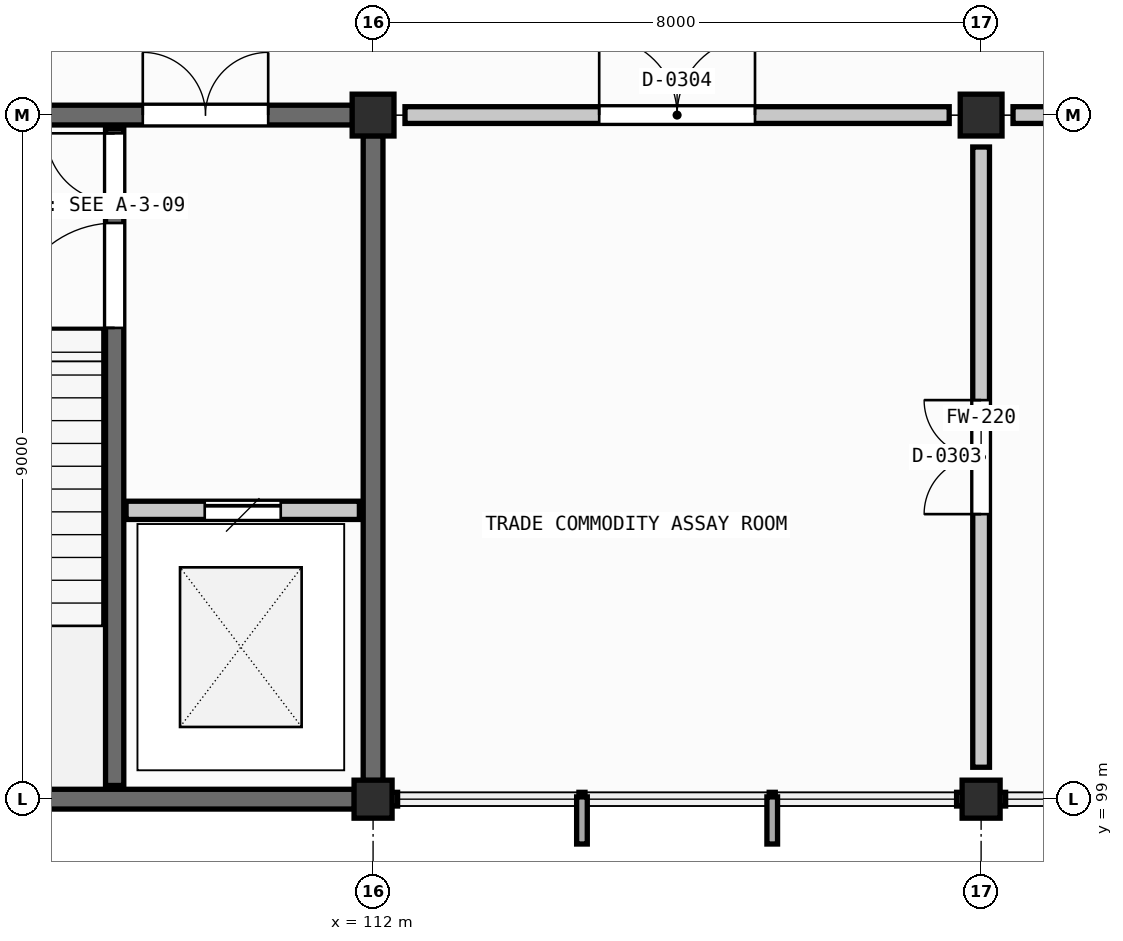
"""IFC4 building model, lengths in metres.
Left out: names, types, materials, properties, quantities, classifications, styles, units other than length and angle.
Written with IfcOpenShell. Run it as: python <this file> out.ifc"""

import sys

from ifc_helpers import new_model, si_unit, direction, frame, frame_2d, origin, origin_2d, place, context, subcontext, project, spatial, rectangle, extrude, element, fill, save


model = new_model("IFC4")
c1 = context("Model", 3, precision=1e-05, world=origin(), true_north=direction((0.0, 1.0)))
c2 = subcontext(c1, "Body", "Model", "MODEL_VIEW")
j1 = project(units=[si_unit("LENGTHUNIT", "METRE"), si_unit("PLANEANGLEUNIT", "RADIAN")], contexts=[c1])
p1 = place(None, origin())
s1 = spatial("IfcSite", under=j1, at=p1, CompositionType="ELEMENT")
p2 = place(p1, origin())
s2 = spatial("IfcBuilding", under=s1, at=p2, CompositionType="ELEMENT")
p3 = place(p2, frame((0.0, 0.0, 13.2)))
s3 = spatial("IfcBuildingStorey", under=s2, at=p3, CompositionType="ELEMENT", Elevation=13.2)
p4 = place(p3, frame((112.0, 99.0, 0.0), z_axis=(0.0, 0.0, 1.0), x_axis=(1.0, 0.0, 0.0)))
e1 = element("IfcColumn", 1, at=p4, inside=s3, PredefinedType="COLUMN", context=c2, shape_type="SweptSolid", body=[
    extrude(rectangle(XDim=0.5, YDim=0.5, at=origin_2d()), origin(), (0.0, 0.0, 1.0), 3.9),
])
p5 = place(p3, frame((112.0, 108.0, 0.0), z_axis=(0.0, 0.0, 1.0), x_axis=(1.0, 0.0, 0.0)))
e2 = element("IfcColumn", 2, at=p5, inside=s3, PredefinedType="COLUMN", context=c2, shape_type="SweptSolid", body=[
    extrude(rectangle(XDim=0.55, YDim=0.55, at=origin_2d()), origin(), (0.0, 0.0, 1.0), 3.9),
])
p6 = place(p3, frame((120.0, 99.0, 0.0), z_axis=(0.0, 0.0, 1.0), x_axis=(1.0, 0.0, 0.0)))
e3 = element("IfcColumn", 3, at=p6, inside=s3, PredefinedType="COLUMN", context=c2, shape_type="SweptSolid", body=[
    extrude(rectangle(XDim=0.5, YDim=0.5, at=origin_2d()), origin(), (0.0, 0.0, 1.0), 3.9),
])
p7 = place(p3, frame((120.0, 108.0, 0.0), z_axis=(0.0, 0.0, 1.0), x_axis=(1.0, 0.0, 0.0)))
e4 = element("IfcColumn", 4, at=p7, inside=s3, PredefinedType="COLUMN", context=c2, shape_type="SweptSolid", body=[
    extrude(rectangle(XDim=0.55, YDim=0.55, at=origin_2d()), origin(), (0.0, 0.0, 1.0), 3.9),
])
p8 = place(p3, frame((104.245, 99.0, 0.0), z_axis=(0.0, 0.0, 1.0), x_axis=(1.0, 0.0, 0.0)))
e5 = element("IfcWall", 5, at=p8, inside=s3, PredefinedType="SHEAR", context=c2, shape_type="SweptSolid", body=[
    extrude(rectangle(XDim=7.51, YDim=0.26, at=frame_2d((3.755, 0.0))), origin(), (0.0, 0.0, 1.0), 3.665),
])
p9 = place(p3, frame((104.27, 108.0, 0.0), z_axis=(0.0, 0.0, 1.0), x_axis=(1.0, 0.0, 0.0)))
e6 = element("IfcWall", 6, at=p9, inside=s3, PredefinedType="SHEAR", context=c2, shape_type="SweptSolid", body=[
    extrude(rectangle(XDim=7.46, YDim=0.26, at=frame_2d((3.73, 0.0))), origin(), (0.0, 0.0, 1.0), 3.665),
])
p10 = place(p9, frame((4.7, 0.0, 0.0)))
e7 = element("IfcOpeningElement", 7, at=p10, cuts=e6, PredefinedType="OPENING", context=c2, shape_type="SweptSolid", body=[
    extrude(rectangle(XDim=1.65, YDim=2.22, at=frame_2d((0.825, 1.11))), frame((0.0, 0.14, 0.0), z_axis=(0.0, -1.0, 0.0), x_axis=(1.0, 0.0, 0.0)), (0.0, 0.0, 1.0), 0.28),
])
p11 = place(p3, frame((112.0, 99.245, 0.0), z_axis=(0.0, 0.0, 1.0), x_axis=(0.0, 1.0, 0.0)))
e8 = element("IfcWall", 8, at=p11, inside=s3, PredefinedType="SHEAR", context=c2, shape_type="SweptSolid", body=[
    extrude(rectangle(XDim=8.485, YDim=0.26, at=frame_2d((4.242, 0.0))), origin(), (0.0, 0.0, 1.0), 3.665),
])
p12 = place(p3, frame((108.6, 99.18, 0.0), z_axis=(0.0, 0.0, 1.0), x_axis=(0.0, 1.0, 0.0)))
e9 = element("IfcWall", 9, at=p12, inside=s3, PredefinedType="SHEAR", context=c2, shape_type="SweptSolid", body=[
    extrude(rectangle(XDim=8.64, YDim=0.24, at=frame_2d((4.32, 0.0))), origin(), (0.0, 0.0, 1.0), 3.665),
])
p13 = place(p12, frame((6.02, 0.0, 0.0)))
e10 = element("IfcOpeningElement", 10, at=p13, cuts=e9, PredefinedType="OPENING", context=c2, shape_type="SweptSolid", body=[
    extrude(rectangle(XDim=1.38, YDim=2.22, at=frame_2d((0.69, 1.11))), frame((0.0, 0.13, 0.0), z_axis=(0.0, -1.0, 0.0), x_axis=(1.0, 0.0, 0.0)), (0.0, 0.0, 1.0), 0.26),
])
p14 = place(p12, frame((7.68, 0.0, 0.0)))
e11 = element("IfcOpeningElement", 11, at=p14, cuts=e9, PredefinedType="OPENING", context=c2, shape_type="SweptSolid", body=[
    extrude(rectangle(XDim=0.9, YDim=2.05, at=frame_2d((0.45, 1.025))), frame((0.0, 0.13, 0.0), z_axis=(0.0, -1.0, 0.0), x_axis=(1.0, 0.0, 0.0)), (0.0, 0.0, 1.0), 0.26),
])
p15 = place(p3, frame((104.18, 106.75, 0.0), z_axis=(0.0, 0.0, 1.0), x_axis=(1.0, 0.0, 0.0)))
e12 = element("IfcWall", 12, at=p15, inside=s3, PredefinedType="PARTITIONING", context=c2, shape_type="SweptSolid", body=[
    extrude(rectangle(XDim=4.28, YDim=0.13, at=frame_2d((2.14, 0.0))), origin(), (0.0, 0.0, 1.0), 3.015),
])
p16 = place(p3, frame((108.75, 102.8, 0.0), z_axis=(0.0, 0.0, 1.0), x_axis=(1.0, 0.0, 0.0)))
e13 = element("IfcWall", 13, at=p16, inside=s3, PredefinedType="SHEAR", context=c2, shape_type="SweptSolid", body=[
    extrude(rectangle(XDim=3.07, YDim=0.24, at=frame_2d((1.535, 0.0))), origin(), (0.0, 0.0, 1.0), 3.015),
])
p17 = place(p16, frame((1.035, 0.0, 0.0)))
e14 = element("IfcOpeningElement", 14, at=p17, cuts=e13, PredefinedType="OPENING", context=c2, shape_type="SweptSolid", body=[
    extrude(rectangle(XDim=1.0, YDim=2.15, at=frame_2d((0.5, 1.075))), frame((0.0, 0.13, 0.0), z_axis=(0.0, -1.0, 0.0), x_axis=(1.0, 0.0, 0.0)), (0.0, 0.0, 1.0), 0.26),
])
p18 = place(p3, frame((120.0, 99.42, 0.0), z_axis=(0.0, 0.0, 1.0), x_axis=(0.0, 1.0, 0.0)))
e15 = element("IfcWall", 15, at=p18, inside=s3, PredefinedType="SOLIDWALL", context=c2, shape_type="SweptSolid", body=[
    extrude(rectangle(XDim=8.16, YDim=0.22, at=frame_2d((4.08, 0.0))), origin(), (0.0, 0.0, 1.0), 2.75),
])
p19 = place(p18, frame((3.33, 0.0, 0.0)))
e16 = element("IfcOpeningElement", 16, at=p19, cuts=e15, PredefinedType="OPENING", context=c2, shape_type="SweptSolid", body=[
    extrude(rectangle(XDim=1.5, YDim=2.25, at=frame_2d((0.75, 1.125))), frame((0.0, 0.12, 0.0), z_axis=(0.0, -1.0, 0.0), x_axis=(1.0, 0.0, 0.0)), (0.0, 0.0, 1.0), 0.24),
])
p20 = place(p3, frame((112.42, 108.0, 0.0), z_axis=(0.0, 0.0, 1.0), x_axis=(1.0, 0.0, 0.0)))
e17 = element("IfcWall", 17, at=p20, inside=s3, PredefinedType="SOLIDWALL", context=c2, shape_type="SweptSolid", body=[
    extrude(rectangle(XDim=7.16, YDim=0.22, at=frame_2d((3.58, 0.0))), origin(), (0.0, 0.0, 1.0), 2.75),
])
p21 = place(p20, frame((2.555, 0.0, 0.0)))
e18 = element("IfcOpeningElement", 18, at=p21, cuts=e17, PredefinedType="OPENING", context=c2, shape_type="SweptSolid", body=[
    extrude(rectangle(XDim=2.05, YDim=2.4, at=frame_2d((1.025, 1.2))), frame((0.0, 0.12, 0.0), z_axis=(0.0, -1.0, 0.0), x_axis=(1.0, 0.0, 0.0)), (0.0, 0.0, 1.0), 0.24),
])
p22 = place(p3, frame((120.42, 108.0, 0.0), z_axis=(0.0, 0.0, 1.0), x_axis=(1.0, 0.0, 0.0)))
e19 = element("IfcWall", 19, at=p22, inside=s3, PredefinedType="SOLIDWALL", context=c2, shape_type="SweptSolid", body=[
    extrude(rectangle(XDim=6.76, YDim=0.22, at=frame_2d((3.38, 0.0))), origin(), (0.0, 0.0, 1.0), 2.75),
])
p23 = place(p22, frame((2.63, 0.0, 0.0)))
e20 = element("IfcOpeningElement", 20, at=p23, cuts=e19, PredefinedType="OPENING", context=c2, shape_type="SweptSolid", body=[
    extrude(rectangle(XDim=1.5, YDim=2.25, at=frame_2d((0.75, 1.125))), frame((0.0, 0.12, 0.0), z_axis=(0.0, -1.0, 0.0), x_axis=(1.0, 0.0, 0.0)), (0.0, 0.0, 1.0), 0.24),
])
p24 = place(p13, origin())
e21 = element("IfcDoor", 21, at=p24, inside=s3, OperationType="SINGLE_SWING_LEFT", PredefinedType="DOOR", context=c2, shape_type="SweptSolid", body=[
    extrude(rectangle(XDim=1.38, YDim=2.22, at=frame_2d((0.69, 1.11))), frame((0.0, 0.025, 0.0), z_axis=(0.0, -1.0, 0.0), x_axis=(1.0, 0.0, 0.0)), (0.0, 0.0, 1.0), 0.05),
])
fill(e10, e21)
p25 = place(p14, origin())
e22 = element("IfcDoor", 22, at=p25, inside=s3, OperationType="SINGLE_SWING_RIGHT", PredefinedType="DOOR", context=c2, shape_type="SweptSolid", body=[
    extrude(rectangle(XDim=0.9, YDim=2.05, at=frame_2d((0.45, 1.025))), frame((0.0, 0.025, 0.0), z_axis=(0.0, -1.0, 0.0), x_axis=(1.0, 0.0, 0.0)), (0.0, 0.0, 1.0), 0.05),
])
fill(e11, e22)
p26 = place(p10, origin())
e23 = element("IfcDoor", 23, at=p26, inside=s3, OperationType="DOUBLE_DOOR_SINGLE_SWING", PredefinedType="DOOR", context=c2, shape_type="SweptSolid", body=[
    extrude(rectangle(XDim=1.65, YDim=2.22, at=frame_2d((0.825, 1.11))), frame((0.0, 0.025, 0.0), z_axis=(0.0, -1.0, 0.0), x_axis=(1.0, 0.0, 0.0)), (0.0, 0.0, 1.0), 0.05),
])
fill(e7, e23)
p27 = place(p17, origin())
e24 = element("IfcDoor", 24, at=p27, inside=s3, OperationType="SLIDING_TO_LEFT", PredefinedType="DOOR", context=c2, shape_type="SweptSolid", body=[
    extrude(rectangle(XDim=1.0, YDim=2.15, at=frame_2d((0.5, 1.075))), frame((0.0, 0.025, 0.0), z_axis=(0.0, -1.0, 0.0), x_axis=(1.0, 0.0, 0.0)), (0.0, 0.0, 1.0), 0.05),
])
fill(e14, e24)
p28 = place(p19, origin())
e25 = element("IfcDoor", 25, at=p28, inside=s3, OperationType="DOUBLE_DOOR_SINGLE_SWING", PredefinedType="DOOR", context=c2, shape_type="SweptSolid", body=[
    extrude(rectangle(XDim=1.5, YDim=2.25, at=frame_2d((0.75, 1.125))), frame((0.0, 0.025, 0.0), z_axis=(0.0, -1.0, 0.0), x_axis=(1.0, 0.0, 0.0)), (0.0, 0.0, 1.0), 0.05),
])
fill(e16, e25)
p29 = place(p21, origin())
e26 = element("IfcDoor", 26, at=p29, inside=s3, OperationType="DOUBLE_DOOR_SINGLE_SWING", PredefinedType="DOOR", context=c2, shape_type="SweptSolid", body=[
    extrude(rectangle(XDim=2.05, YDim=2.4, at=frame_2d((1.025, 1.2))), frame((0.0, 0.025, 0.0), z_axis=(0.0, -1.0, 0.0), x_axis=(1.0, 0.0, 0.0)), (0.0, 0.0, 1.0), 0.05),
])
fill(e18, e26)
save(model, sys.argv[1])
